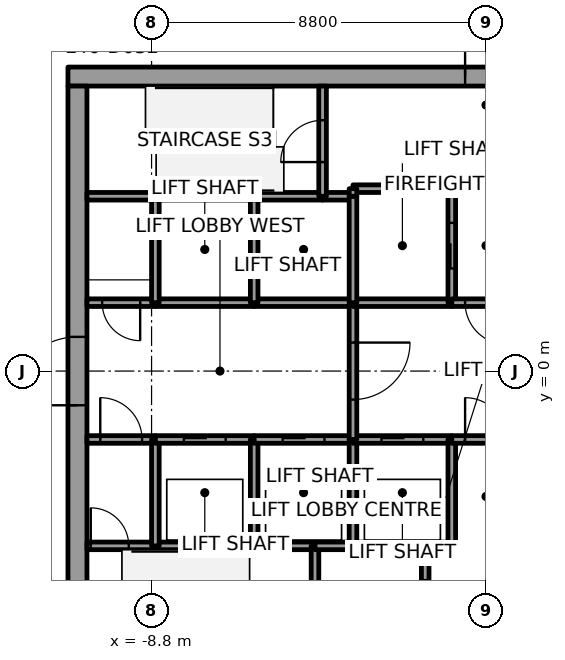
"""IFC4 building model, lengths in metres.
Left out: names, types, materials, properties, quantities, classifications, styles, units other than length and angle.
Written with IfcOpenShell. Run it as: python <this file> out.ifc"""

import sys

from ifc_helpers import new_model, si_unit, direction, frame, frame_2d, origin, place, context, subcontext, project, spatial, rectangle, extrude, element, fill, save


model = new_model("IFC4")
c1 = context("Model", 3, precision=1e-05, world=origin(), true_north=direction((0.0, 1.0)))
c2 = subcontext(c1, "Body", "Model", "MODEL_VIEW")
j1 = project(units=[si_unit("LENGTHUNIT", "METRE"), si_unit("PLANEANGLEUNIT", "RADIAN")], contexts=[c1])
p1 = place(None, origin())
s1 = spatial("IfcSite", under=j1, at=p1, CompositionType="ELEMENT")
p2 = place(p1, origin())
s2 = spatial("IfcBuilding", under=s1, at=p2, CompositionType="ELEMENT")
p3 = place(p2, frame((0.0, 0.0, 205.8)))
s3 = spatial("IfcBuildingStorey", under=s2, at=p3, CompositionType="ELEMENT", Elevation=205.8)
p4 = place(p3, frame((-11.0, 7.75, 0.0), z_axis=(0.0, 0.0, 1.0), x_axis=(1.0, 0.0, 0.0)))
e1 = element("IfcWall", 1, at=p4, inside=s3, PredefinedType="SHEAR", context=c2, shape_type="SweptSolid", body=[
    extrude(rectangle(XDim=22.0, YDim=0.5, at=frame_2d((11.0, 0.0))), origin(), (0.0, 0.0, 1.0), 4.0),
])
p5 = place(p4, frame((10.45, 0.0, 0.0)))
e2 = element("IfcOpeningElement", 2, at=p5, cuts=e1, PredefinedType="OPENING", context=c2, shape_type="SweptSolid", body=[
    extrude(rectangle(XDim=1.1, YDim=2.1, at=frame_2d((0.55, 1.05))), frame((0.0, 0.25, 0.0), z_axis=(0.0, -1.0, 0.0), x_axis=(1.0, 0.0, 0.0)), (0.0, 0.0, 1.0), 0.5),
])
p6 = place(p3, frame((-10.75, -7.5, 0.0), z_axis=(0.0, 0.0, 1.0), x_axis=(0.0, 1.0, 0.0)))
e3 = element("IfcWall", 3, at=p6, inside=s3, PredefinedType="SHEAR", context=c2, shape_type="SweptSolid", body=[
    extrude(rectangle(XDim=15.0, YDim=0.5, at=frame_2d((7.5, 0.0))), origin(), (0.0, 0.0, 1.0), 4.0),
])
p7 = place(p6, frame((6.6, 0.0, 0.0)))
e4 = element("IfcOpeningElement", 4, at=p7, cuts=e3, PredefinedType="OPENING", context=c2, shape_type="SweptSolid", body=[
    extrude(rectangle(XDim=1.8, YDim=2.1, at=frame_2d((0.9, 1.05))), frame((0.0, 0.25, 0.0), z_axis=(0.0, -1.0, 0.0), x_axis=(1.0, 0.0, 0.0)), (0.0, 0.0, 1.0), 0.5),
])
p8 = place(p3, frame((-10.5, -4.6, 0.0), z_axis=(0.0, 0.0, 1.0), x_axis=(1.0, 0.0, 0.0)))
e5 = element("IfcWall", 5, at=p8, inside=s3, PredefinedType="SOLIDWALL", context=c2, shape_type="SweptSolid", body=[
    extrude(rectangle(XDim=1.8, YDim=0.2, at=frame_2d((0.9, 0.0))), origin(), (0.0, 0.0, 1.0), 3.85),
])
p9 = place(p8, frame((0.1, 0.0, 0.0)))
e6 = element("IfcOpeningElement", 6, at=p9, cuts=e5, PredefinedType="OPENING", context=c2, shape_type="SweptSolid", body=[
    extrude(rectangle(XDim=1.0, YDim=2.1, at=frame_2d((0.5, 1.05))), frame((0.0, 0.1, 0.0), z_axis=(0.0, -1.0, 0.0), x_axis=(1.0, 0.0, 0.0)), (0.0, 0.0, 1.0), 0.2),
])
p10 = place(p3, frame((-10.5, -1.8, 0.0), z_axis=(0.0, 0.0, 1.0), x_axis=(1.0, 0.0, 0.0)))
e7 = element("IfcWall", 7, at=p10, inside=s3, PredefinedType="SOLIDWALL", context=c2, shape_type="SweptSolid", body=[
    extrude(rectangle(XDim=1.8, YDim=0.2, at=frame_2d((0.9, 0.0))), origin(), (0.0, 0.0, 1.0), 3.85),
])
p11 = place(p10, frame((0.35, 0.0, 0.0)))
e8 = element("IfcOpeningElement", 8, at=p11, cuts=e7, PredefinedType="OPENING", context=c2, shape_type="SweptSolid", body=[
    extrude(rectangle(XDim=1.1, YDim=2.1, at=frame_2d((0.55, 1.05))), frame((0.0, 0.1, 0.0), z_axis=(0.0, -1.0, 0.0), x_axis=(1.0, 0.0, 0.0)), (0.0, 0.0, 1.0), 0.2),
])
p12 = place(p3, frame((-8.7, 1.8, 0.0), z_axis=(0.0, 0.0, 1.0), x_axis=(-1.0, 0.0, 0.0)))
e9 = element("IfcWall", 9, at=p12, inside=s3, PredefinedType="SOLIDWALL", context=c2, shape_type="SweptSolid", body=[
    extrude(rectangle(XDim=1.8, YDim=0.2, at=frame_2d((0.9, 0.0))), origin(), (0.0, 0.0, 1.0), 3.85),
])
p13 = place(p12, frame((0.4, 0.0, 0.0)))
e10 = element("IfcOpeningElement", 10, at=p13, cuts=e9, PredefinedType="OPENING", context=c2, shape_type="SweptSolid", body=[
    extrude(rectangle(XDim=1.0, YDim=2.1, at=frame_2d((0.5, 1.05))), frame((0.0, 0.1, 0.0), z_axis=(0.0, -1.0, 0.0), x_axis=(1.0, 0.0, 0.0)), (0.0, 0.0, 1.0), 0.2),
])
p14 = place(p3, frame((-8.7, 4.6, 0.0), z_axis=(0.0, 0.0, 1.0), x_axis=(-1.0, 0.0, 0.0)))
e11 = element("IfcWall", 11, at=p14, inside=s3, PredefinedType="SOLIDWALL", context=c2, shape_type="SweptSolid", body=[
    extrude(rectangle(XDim=1.8, YDim=0.2, at=frame_2d((0.9, 0.0))), origin(), (0.0, 0.0, 1.0), 3.85),
])
p15 = place(p3, frame((-8.7, -4.6, 0.0), z_axis=(0.0, 0.0, 1.0), x_axis=(1.0, 0.0, 0.0)))
e12 = element("IfcWall", 12, at=p15, inside=s3, PredefinedType="SOLIDWALL", context=c2, shape_type="SweptSolid", body=[
    extrude(rectangle(XDim=2.6, YDim=0.2, at=frame_2d((1.3, 0.0))), origin(), (0.0, 0.0, 1.0), 3.85),
])
p16 = place(p3, frame((-8.7, -4.6, 0.0), z_axis=(0.0, 0.0, 1.0), x_axis=(0.0, 1.0, 0.0)))
e13 = element("IfcWall", 13, at=p16, inside=s3, PredefinedType="SOLIDWALL", context=c2, shape_type="SweptSolid", body=[
    extrude(rectangle(XDim=2.8, YDim=0.2, at=frame_2d((1.4, 0.0))), origin(), (0.0, 0.0, 1.0), 3.85),
])
p17 = place(p3, frame((-8.7, -1.8, 0.0), z_axis=(0.0, 0.0, 1.0), x_axis=(1.0, 0.0, 0.0)))
e14 = element("IfcWall", 14, at=p17, inside=s3, PredefinedType="SOLIDWALL", context=c2, shape_type="SweptSolid", body=[
    extrude(rectangle(XDim=2.6, YDim=0.2, at=frame_2d((1.3, 0.0))), origin(), (0.0, 0.0, 1.0), 3.85),
])
p18 = place(p17, frame((0.75, 0.0, 0.0)))
e15 = element("IfcOpeningElement", 15, at=p18, cuts=e14, PredefinedType="OPENING", context=c2, shape_type="SweptSolid", body=[
    extrude(rectangle(XDim=1.1, YDim=2.1, at=frame_2d((0.55, 1.05))), frame((0.0, 0.1, 0.0), z_axis=(0.0, -1.0, 0.0), x_axis=(1.0, 0.0, 0.0)), (0.0, 0.0, 1.0), 0.2),
])
p19 = place(p3, frame((-6.1, 1.8, 0.0), z_axis=(0.0, 0.0, 1.0), x_axis=(-1.0, 0.0, 0.0)))
e16 = element("IfcWall", 16, at=p19, inside=s3, PredefinedType="SOLIDWALL", context=c2, shape_type="SweptSolid", body=[
    extrude(rectangle(XDim=2.6, YDim=0.2, at=frame_2d((1.3, 0.0))), origin(), (0.0, 0.0, 1.0), 3.85),
])
p20 = place(p3, frame((-8.7, 1.8, 0.0), z_axis=(0.0, 0.0, 1.0), x_axis=(0.0, 1.0, 0.0)))
e17 = element("IfcWall", 17, at=p20, inside=s3, PredefinedType="SOLIDWALL", context=c2, shape_type="SweptSolid", body=[
    extrude(rectangle(XDim=2.8, YDim=0.2, at=frame_2d((1.4, 0.0))), origin(), (0.0, 0.0, 1.0), 3.85),
])
p21 = place(p3, frame((-6.1, 4.6, 0.0), z_axis=(0.0, 0.0, 1.0), x_axis=(-1.0, 0.0, 0.0)))
e18 = element("IfcWall", 18, at=p21, inside=s3, PredefinedType="SOLIDWALL", context=c2, shape_type="SweptSolid", body=[
    extrude(rectangle(XDim=2.6, YDim=0.2, at=frame_2d((1.3, 0.0))), origin(), (0.0, 0.0, 1.0), 3.85),
])
p22 = place(p3, frame((-6.1, -4.6, 0.0), z_axis=(0.0, 0.0, 1.0), x_axis=(1.0, 0.0, 0.0)))
e19 = element("IfcWall", 19, at=p22, inside=s3, PredefinedType="SOLIDWALL", context=c2, shape_type="SweptSolid", body=[
    extrude(rectangle(XDim=1.6, YDim=0.2, at=frame_2d((0.8, 0.0))), origin(), (0.0, 0.0, 1.0), 3.85),
])
p23 = place(p3, frame((-6.1, -4.6, 0.0), z_axis=(0.0, 0.0, 1.0), x_axis=(0.0, 1.0, 0.0)))
e20 = element("IfcWall", 20, at=p23, inside=s3, PredefinedType="SOLIDWALL", context=c2, shape_type="SweptSolid", body=[
    extrude(rectangle(XDim=2.8, YDim=0.2, at=frame_2d((1.4, 0.0))), origin(), (0.0, 0.0, 1.0), 3.85),
])
p24 = place(p3, frame((-6.1, -1.8, 0.0), z_axis=(0.0, 0.0, 1.0), x_axis=(1.0, 0.0, 0.0)))
e21 = element("IfcWall", 21, at=p24, inside=s3, PredefinedType="SOLIDWALL", context=c2, shape_type="SweptSolid", body=[
    extrude(rectangle(XDim=2.6, YDim=0.2, at=frame_2d((1.3, 0.0))), origin(), (0.0, 0.0, 1.0), 3.85),
])
p25 = place(p24, frame((0.75, 0.0, 0.0)))
e22 = element("IfcOpeningElement", 22, at=p25, cuts=e21, PredefinedType="OPENING", context=c2, shape_type="SweptSolid", body=[
    extrude(rectangle(XDim=1.1, YDim=2.1, at=frame_2d((0.55, 1.05))), frame((0.0, 0.1, 0.0), z_axis=(0.0, -1.0, 0.0), x_axis=(1.0, 0.0, 0.0)), (0.0, 0.0, 1.0), 0.2),
])
p26 = place(p3, frame((-3.5, 1.8, 0.0), z_axis=(0.0, 0.0, 1.0), x_axis=(-1.0, 0.0, 0.0)))
e23 = element("IfcWall", 23, at=p26, inside=s3, PredefinedType="SOLIDWALL", context=c2, shape_type="SweptSolid", body=[
    extrude(rectangle(XDim=2.6, YDim=0.2, at=frame_2d((1.3, 0.0))), origin(), (0.0, 0.0, 1.0), 3.85),
])
p27 = place(p3, frame((-6.1, 1.8, 0.0), z_axis=(0.0, 0.0, 1.0), x_axis=(0.0, 1.0, 0.0)))
e24 = element("IfcWall", 24, at=p27, inside=s3, PredefinedType="SOLIDWALL", context=c2, shape_type="SweptSolid", body=[
    extrude(rectangle(XDim=2.8, YDim=0.2, at=frame_2d((1.4, 0.0))), origin(), (0.0, 0.0, 1.0), 3.85),
])
p28 = place(p3, frame((-4.3, 4.6, 0.0), z_axis=(0.0, 0.0, 1.0), x_axis=(-1.0, 0.0, 0.0)))
e25 = element("IfcWall", 25, at=p28, inside=s3, PredefinedType="SOLIDWALL", context=c2, shape_type="SweptSolid", body=[
    extrude(rectangle(XDim=1.8, YDim=0.2, at=frame_2d((0.9, 0.0))), origin(), (0.0, 0.0, 1.0), 3.85),
])
p29 = place(p3, frame((-4.5, -4.6, 0.0), z_axis=(0.0, 0.0, 1.0), x_axis=(0.0, -1.0, 0.0)))
e26 = element("IfcWall", 26, at=p29, inside=s3, PredefinedType="SOLIDWALL", context=c2, shape_type="SweptSolid", body=[
    extrude(rectangle(XDim=2.9, YDim=0.2, at=frame_2d((1.45, 0.0))), origin(), (0.0, 0.0, 1.0), 3.85),
])
p30 = place(p3, frame((-4.5, -4.6, 0.0), z_axis=(0.0, 0.0, 1.0), x_axis=(1.0, 0.0, 0.0)))
e27 = element("IfcWall", 27, at=p30, inside=s3, PredefinedType="SOLIDWALL", context=c2, shape_type="SweptSolid", body=[
    extrude(rectangle(XDim=1.0, YDim=0.2, at=frame_2d((0.5, 0.0))), origin(), (0.0, 0.0, 1.0), 3.85),
])
p31 = place(p3, frame((-3.5, 4.6, 0.0), z_axis=(0.0, 0.0, 1.0), x_axis=(-1.0, 0.0, 0.0)))
e28 = element("IfcWall", 28, at=p31, inside=s3, PredefinedType="SOLIDWALL", context=c2, shape_type="SweptSolid", body=[
    extrude(rectangle(XDim=0.8, YDim=0.2, at=frame_2d((0.4, 0.0))), origin(), (0.0, 0.0, 1.0), 3.85),
])
p32 = place(p3, frame((-4.3, 4.6, 0.0), z_axis=(0.0, 0.0, 1.0), x_axis=(0.0, 1.0, 0.0)))
e29 = element("IfcWall", 29, at=p32, inside=s3, PredefinedType="SOLIDWALL", context=c2, shape_type="SweptSolid", body=[
    extrude(rectangle(XDim=2.9, YDim=0.2, at=frame_2d((1.45, 0.0))), origin(), (0.0, 0.0, 1.0), 3.85),
])
p33 = place(p32, frame((0.9, 0.0, 0.0)))
e30 = element("IfcOpeningElement", 30, at=p33, cuts=e29, PredefinedType="OPENING", context=c2, shape_type="SweptSolid", body=[
    extrude(rectangle(XDim=1.1, YDim=2.1, at=frame_2d((0.55, 1.05))), frame((0.0, 0.1, 0.0), z_axis=(0.0, -1.0, 0.0), x_axis=(1.0, 0.0, 0.0)), (0.0, 0.0, 1.0), 0.2),
])
p34 = place(p3, frame((-3.5, -4.6, 0.0), z_axis=(0.0, 0.0, 1.0), x_axis=(1.0, 0.0, 0.0)))
e31 = element("IfcWall", 31, at=p34, inside=s3, PredefinedType="SOLIDWALL", context=c2, shape_type="SweptSolid", body=[
    extrude(rectangle(XDim=1.9, YDim=0.2, at=frame_2d((0.95, 0.0))), origin(), (0.0, 0.0, 1.0), 3.85),
])
p35 = place(p3, frame((-3.5, -4.6, 0.0), z_axis=(0.0, 0.0, 1.0), x_axis=(0.0, 1.0, 0.0)))
e32 = element("IfcWall", 32, at=p35, inside=s3, PredefinedType="SOLIDWALL", context=c2, shape_type="SweptSolid", body=[
    extrude(rectangle(XDim=2.8, YDim=0.2, at=frame_2d((1.4, 0.0))), origin(), (0.0, 0.0, 1.0), 3.85),
])
p36 = place(p3, frame((-3.5, -1.8, 0.0), z_axis=(0.0, 0.0, 1.0), x_axis=(1.0, 0.0, 0.0)))
e33 = element("IfcWall", 33, at=p36, inside=s3, PredefinedType="SOLIDWALL", context=c2, shape_type="SweptSolid", body=[
    extrude(rectangle(XDim=2.6, YDim=0.2, at=frame_2d((1.3, 0.0))), origin(), (0.0, 0.0, 1.0), 3.85),
])
p37 = place(p36, frame((0.75, 0.0, 0.0)))
e34 = element("IfcOpeningElement", 34, at=p37, cuts=e33, PredefinedType="OPENING", context=c2, shape_type="SweptSolid", body=[
    extrude(rectangle(XDim=1.1, YDim=2.1, at=frame_2d((0.55, 1.05))), frame((0.0, 0.1, 0.0), z_axis=(0.0, -1.0, 0.0), x_axis=(1.0, 0.0, 0.0)), (0.0, 0.0, 1.0), 0.2),
])
p38 = place(p3, frame((-3.5, 1.8, 0.0), z_axis=(0.0, 0.0, 1.0), x_axis=(0.0, -1.0, 0.0)))
e35 = element("IfcWall", 35, at=p38, inside=s3, PredefinedType="SOLIDWALL", context=c2, shape_type="SweptSolid", body=[
    extrude(rectangle(XDim=3.6, YDim=0.2, at=frame_2d((1.8, 0.0))), origin(), (0.0, 0.0, 1.0), 3.85),
])
p39 = place(p38, frame((1.05, 0.0, 0.0)))
e36 = element("IfcOpeningElement", 36, at=p39, cuts=e35, PredefinedType="OPENING", context=c2, shape_type="SweptSolid", body=[
    extrude(rectangle(XDim=1.5, YDim=2.1, at=frame_2d((0.75, 1.05))), frame((0.0, 0.1, 0.0), z_axis=(0.0, -1.0, 0.0), x_axis=(1.0, 0.0, 0.0)), (0.0, 0.0, 1.0), 0.2),
])
p40 = place(p3, frame((-0.9, 1.8, 0.0), z_axis=(0.0, 0.0, 1.0), x_axis=(-1.0, 0.0, 0.0)))
e37 = element("IfcWall", 37, at=p40, inside=s3, PredefinedType="SOLIDWALL", context=c2, shape_type="SweptSolid", body=[
    extrude(rectangle(XDim=2.6, YDim=0.2, at=frame_2d((1.3, 0.0))), origin(), (0.0, 0.0, 1.0), 3.85),
])
p41 = place(p3, frame((-3.5, 4.6, 0.0), z_axis=(0.0, 0.0, 1.0), x_axis=(0.0, -1.0, 0.0)))
e38 = element("IfcWall", 38, at=p41, inside=s3, PredefinedType="SOLIDWALL", context=c2, shape_type="SweptSolid", body=[
    extrude(rectangle(XDim=2.8, YDim=0.2, at=frame_2d((1.4, 0.0))), origin(), (0.0, 0.0, 1.0), 3.85),
])
p42 = place(p3, frame((-0.9, 1.8, 0.0), z_axis=(0.0, 0.0, 1.0), x_axis=(0.0, 1.0, 0.0)))
e39 = element("IfcWall", 39, at=p42, inside=s3, PredefinedType="SOLIDWALL", context=c2, shape_type="SweptSolid", body=[
    extrude(rectangle(XDim=3.0, YDim=0.2, at=frame_2d((1.5, 0.0))), origin(), (0.0, 0.0, 1.0), 3.85),
])
p43 = place(p42, frame((0.9, 0.0, 0.0)))
e40 = element("IfcOpeningElement", 40, at=p43, cuts=e39, PredefinedType="OPENING", context=c2, shape_type="SweptSolid", body=[
    extrude(rectangle(XDim=1.2, YDim=2.1, at=frame_2d((0.6, 1.05))), frame((0.0, 0.1, 0.0), z_axis=(0.0, -1.0, 0.0), x_axis=(1.0, 0.0, 0.0)), (0.0, 0.0, 1.0), 0.2),
])
p44 = place(p3, frame((-0.9, 4.8, 0.0), z_axis=(0.0, 0.0, 1.0), x_axis=(-1.0, 0.0, 0.0)))
e41 = element("IfcWall", 41, at=p44, inside=s3, PredefinedType="SOLIDWALL", context=c2, shape_type="SweptSolid", body=[
    extrude(rectangle(XDim=2.6, YDim=0.2, at=frame_2d((1.3, 0.0))), origin(), (0.0, 0.0, 1.0), 3.85),
])
p45 = place(p3, frame((-3.5, 4.8, 0.0), z_axis=(0.0, 0.0, 1.0), x_axis=(0.0, -1.0, 0.0)))
e42 = element("IfcWall", 42, at=p45, inside=s3, PredefinedType="SOLIDWALL", context=c2, shape_type="SweptSolid", body=[
    extrude(rectangle(XDim=0.2, YDim=0.2, at=frame_2d((0.1, 0.0))), origin(), (0.0, 0.0, 1.0), 3.85),
])
p46 = place(p3, frame((-1.6, -7.5, 0.0), z_axis=(0.0, 0.0, 1.0), x_axis=(0.0, 1.0, 0.0)))
e43 = element("IfcWall", 43, at=p46, inside=s3, PredefinedType="SOLIDWALL", context=c2, shape_type="SweptSolid", body=[
    extrude(rectangle(XDim=2.9, YDim=0.2, at=frame_2d((1.45, 0.0))), origin(), (0.0, 0.0, 1.0), 3.85),
])
p47 = place(p46, frame((0.9, 0.0, 0.0)))
e44 = element("IfcOpeningElement", 44, at=p47, cuts=e43, PredefinedType="OPENING", context=c2, shape_type="SweptSolid", body=[
    extrude(rectangle(XDim=1.1, YDim=2.1, at=frame_2d((0.55, 1.05))), frame((0.0, 0.1, 0.0), z_axis=(0.0, -1.0, 0.0), x_axis=(1.0, 0.0, 0.0)), (0.0, 0.0, 1.0), 0.2),
])
p48 = place(p3, frame((-1.6, -4.6, 0.0), z_axis=(0.0, 0.0, 1.0), x_axis=(1.0, 0.0, 0.0)))
e45 = element("IfcWall", 45, at=p48, inside=s3, PredefinedType="SOLIDWALL", context=c2, shape_type="SweptSolid", body=[
    extrude(rectangle(XDim=0.7, YDim=0.2, at=frame_2d((0.35, 0.0))), origin(), (0.0, 0.0, 1.0), 3.85),
])
p49 = place(p3, frame((-0.9, -4.6, 0.0), z_axis=(0.0, 0.0, 1.0), x_axis=(0.0, 1.0, 0.0)))
e46 = element("IfcWall", 46, at=p49, inside=s3, PredefinedType="SOLIDWALL", context=c2, shape_type="SweptSolid", body=[
    extrude(rectangle(XDim=2.8, YDim=0.2, at=frame_2d((1.4, 0.0))), origin(), (0.0, 0.0, 1.0), 3.85),
])
p50 = place(p3, frame((-0.9, -1.8, 0.0), z_axis=(0.0, 0.0, 1.0), x_axis=(1.0, 0.0, 0.0)))
e47 = element("IfcWall", 47, at=p50, inside=s3, PredefinedType="SOLIDWALL", context=c2, shape_type="SweptSolid", body=[
    extrude(rectangle(XDim=1.8, YDim=0.2, at=frame_2d((0.9, 0.0))), origin(), (0.0, 0.0, 1.0), 3.85),
])
p51 = place(p50, frame((0.35, 0.0, 0.0)))
e48 = element("IfcOpeningElement", 48, at=p51, cuts=e47, PredefinedType="OPENING", context=c2, shape_type="SweptSolid", body=[
    extrude(rectangle(XDim=1.1, YDim=2.1, at=frame_2d((0.55, 1.05))), frame((0.0, 0.1, 0.0), z_axis=(0.0, -1.0, 0.0), x_axis=(1.0, 0.0, 0.0)), (0.0, 0.0, 1.0), 0.2),
])
p52 = place(p3, frame((0.9, 1.8, 0.0), z_axis=(0.0, 0.0, 1.0), x_axis=(-1.0, 0.0, 0.0)))
e49 = element("IfcWall", 49, at=p52, inside=s3, PredefinedType="SOLIDWALL", context=c2, shape_type="SweptSolid", body=[
    extrude(rectangle(XDim=1.8, YDim=0.2, at=frame_2d((0.9, 0.0))), origin(), (0.0, 0.0, 1.0), 3.85),
])
p53 = place(p52, frame((0.35, 0.0, 0.0)))
e50 = element("IfcOpeningElement", 50, at=p53, cuts=e49, PredefinedType="OPENING", context=c2, shape_type="SweptSolid", body=[
    extrude(rectangle(XDim=1.1, YDim=2.1, at=frame_2d((0.55, 1.05))), frame((0.0, 0.1, 0.0), z_axis=(0.0, -1.0, 0.0), x_axis=(1.0, 0.0, 0.0)), (0.0, 0.0, 1.0), 0.2),
])
p54 = place(p18, origin())
e51 = element("IfcDoor", 51, at=p54, inside=s3, OperationType="SLIDING_TO_RIGHT", PredefinedType="DOOR", context=c2, shape_type="SweptSolid", body=[
    extrude(rectangle(XDim=1.1, YDim=2.1, at=frame_2d((0.55, 1.05))), frame((0.0, 0.025, 0.0), z_axis=(0.0, -1.0, 0.0), x_axis=(1.0, 0.0, 0.0)), (0.0, 0.0, 1.0), 0.05),
])
fill(e15, e51)
p55 = place(p25, origin())
e52 = element("IfcDoor", 52, at=p55, inside=s3, OperationType="SLIDING_TO_RIGHT", PredefinedType="DOOR", context=c2, shape_type="SweptSolid", body=[
    extrude(rectangle(XDim=1.1, YDim=2.1, at=frame_2d((0.55, 1.05))), frame((0.0, 0.025, 0.0), z_axis=(0.0, -1.0, 0.0), x_axis=(1.0, 0.0, 0.0)), (0.0, 0.0, 1.0), 0.05),
])
fill(e22, e52)
p56 = place(p37, origin())
e53 = element("IfcDoor", 53, at=p56, inside=s3, OperationType="SLIDING_TO_RIGHT", PredefinedType="DOOR", context=c2, shape_type="SweptSolid", body=[
    extrude(rectangle(XDim=1.1, YDim=2.1, at=frame_2d((0.55, 1.05))), frame((0.0, 0.025, 0.0), z_axis=(0.0, -1.0, 0.0), x_axis=(1.0, 0.0, 0.0)), (0.0, 0.0, 1.0), 0.05),
])
fill(e34, e53)
p57 = place(p43, origin())
e54 = element("IfcDoor", 54, at=p57, inside=s3, OperationType="SLIDING_TO_LEFT", PredefinedType="DOOR", context=c2, shape_type="SweptSolid", body=[
    extrude(rectangle(XDim=1.2, YDim=2.1, at=frame_2d((0.6, 1.05))), frame((0.0, 0.025, 0.0), z_axis=(0.0, -1.0, 0.0), x_axis=(1.0, 0.0, 0.0)), (0.0, 0.0, 1.0), 0.05),
])
fill(e40, e54)
p58 = place(p39, origin())
e55 = element("IfcDoor", 55, at=p58, inside=s3, OperationType="DOUBLE_DOOR_SINGLE_SWING", PredefinedType="DOOR", context=c2, shape_type="SweptSolid", body=[
    extrude(rectangle(XDim=1.5, YDim=2.1, at=frame_2d((0.75, 1.05))), frame((0.0, 0.025, 0.0), z_axis=(0.0, -1.0, 0.0), x_axis=(1.0, 0.0, 0.0)), (0.0, 0.0, 1.0), 0.05),
])
fill(e36, e55)
p59 = place(p11, origin())
e56 = element("IfcDoor", 56, at=p59, inside=s3, OperationType="SINGLE_SWING_RIGHT", PredefinedType="DOOR", context=c2, shape_type="SweptSolid", body=[
    extrude(rectangle(XDim=1.1, YDim=2.1, at=frame_2d((0.55, 1.05))), frame((0.0, 0.025, 0.0), z_axis=(0.0, -1.0, 0.0), x_axis=(1.0, 0.0, 0.0)), (0.0, 0.0, 1.0), 0.05),
])
fill(e8, e56)
p60 = place(p53, origin())
e57 = element("IfcDoor", 57, at=p60, inside=s3, OperationType="SINGLE_SWING_RIGHT", PredefinedType="DOOR", context=c2, shape_type="SweptSolid", body=[
    extrude(rectangle(XDim=1.1, YDim=2.1, at=frame_2d((0.55, 1.05))), frame((0.0, 0.025, 0.0), z_axis=(0.0, -1.0, 0.0), x_axis=(1.0, 0.0, 0.0)), (0.0, 0.0, 1.0), 0.05),
])
fill(e50, e57)
p61 = place(p51, origin())
e58 = element("IfcDoor", 58, at=p61, inside=s3, OperationType="SINGLE_SWING_LEFT", PredefinedType="DOOR", context=c2, shape_type="SweptSolid", body=[
    extrude(rectangle(XDim=1.1, YDim=2.1, at=frame_2d((0.55, 1.05))), frame((0.0, 0.025, 0.0), z_axis=(0.0, -1.0, 0.0), x_axis=(1.0, 0.0, 0.0)), (0.0, 0.0, 1.0), 0.05),
])
fill(e48, e58)
p62 = place(p13, origin())
e59 = element("IfcDoor", 59, at=p62, inside=s3, OperationType="SINGLE_SWING_RIGHT", PredefinedType="DOOR", context=c2, shape_type="SweptSolid", body=[
    extrude(rectangle(XDim=1.0, YDim=2.1, at=frame_2d((0.5, 1.05))), frame((0.0, 0.025, 0.0), z_axis=(0.0, -1.0, 0.0), x_axis=(1.0, 0.0, 0.0)), (0.0, 0.0, 1.0), 0.05),
])
fill(e10, e59)
p63 = place(p9, origin())
e60 = element("IfcDoor", 60, at=p63, inside=s3, OperationType="SINGLE_SWING_LEFT", PredefinedType="DOOR", context=c2, shape_type="SweptSolid", body=[
    extrude(rectangle(XDim=1.0, YDim=2.1, at=frame_2d((0.5, 1.05))), frame((0.0, 0.025, 0.0), z_axis=(0.0, -1.0, 0.0), x_axis=(1.0, 0.0, 0.0)), (0.0, 0.0, 1.0), 0.05),
])
fill(e6, e60)
p64 = place(p33, origin())
e61 = element("IfcDoor", 61, at=p64, inside=s3, OperationType="SINGLE_SWING_RIGHT", PredefinedType="DOOR", context=c2, shape_type="SweptSolid", body=[
    extrude(rectangle(XDim=1.1, YDim=2.1, at=frame_2d((0.55, 1.05))), frame((0.0, 0.025, 0.0), z_axis=(0.0, -1.0, 0.0), x_axis=(1.0, 0.0, 0.0)), (0.0, 0.0, 1.0), 0.05),
])
fill(e30, e61)
p65 = place(p7, origin())
e62 = element("IfcDoor", 62, at=p65, inside=s3, OperationType="DOUBLE_DOOR_SINGLE_SWING", PredefinedType="DOOR", context=c2, shape_type="SweptSolid", body=[
    extrude(rectangle(XDim=1.8, YDim=2.1, at=frame_2d((0.9, 1.05))), frame((0.0, 0.025, 0.0), z_axis=(0.0, -1.0, 0.0), x_axis=(1.0, 0.0, 0.0)), (0.0, 0.0, 1.0), 0.05),
])
fill(e4, e62)
p66 = place(p5, origin())
e63 = element("IfcDoor", 63, at=p66, inside=s3, OperationType="SINGLE_SWING_LEFT", PredefinedType="DOOR", context=c2, shape_type="SweptSolid", body=[
    extrude(rectangle(XDim=1.1, YDim=2.1, at=frame_2d((0.55, 1.05))), frame((0.0, 0.025, 0.0), z_axis=(0.0, -1.0, 0.0), x_axis=(1.0, 0.0, 0.0)), (0.0, 0.0, 1.0), 0.05),
])
fill(e2, e63)
save(model, sys.argv[1])
